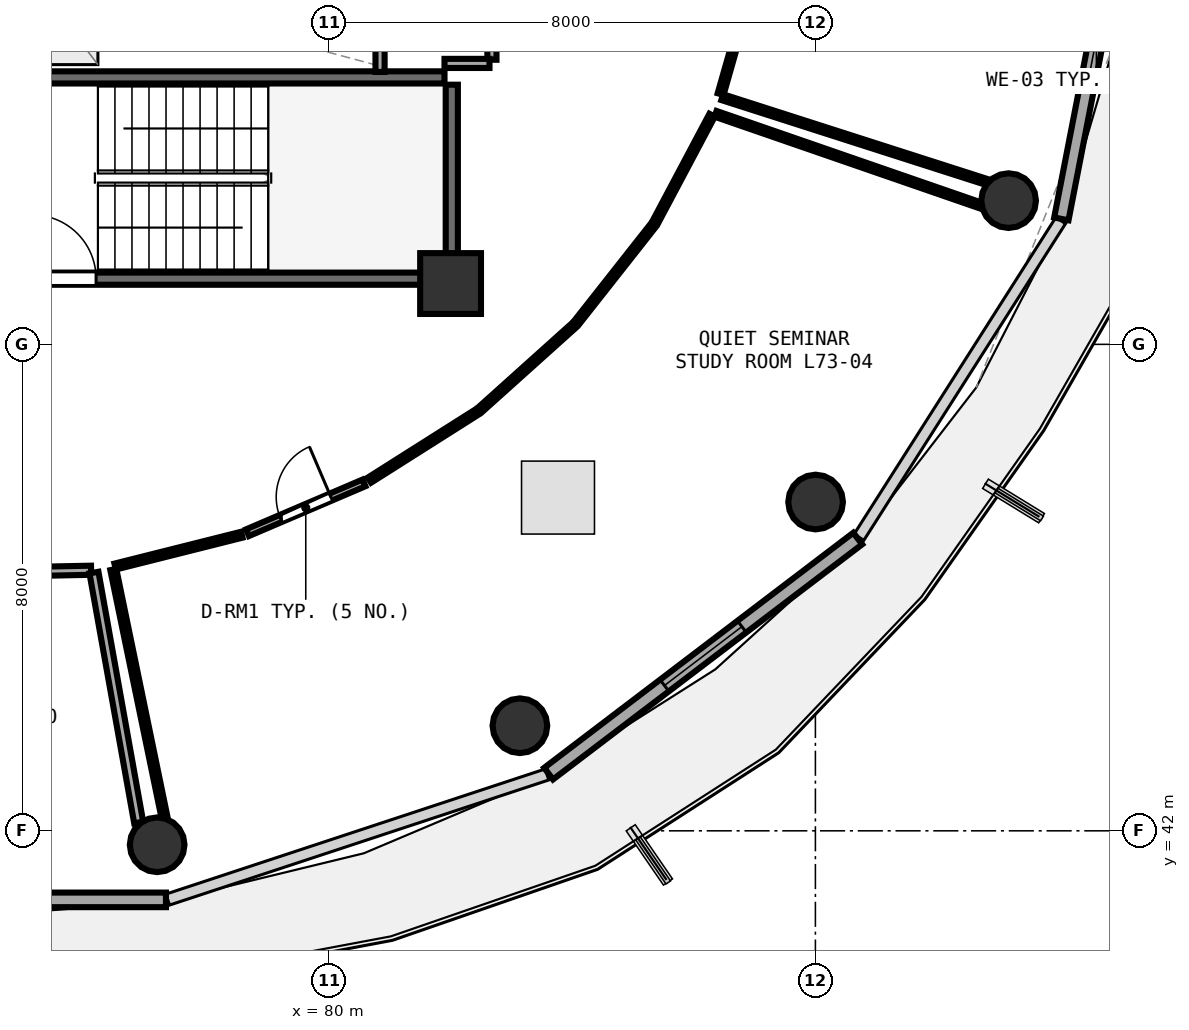
"""IFC4 building model, lengths in metres.
Left out: names, types, materials, properties, quantities, classifications, styles, units other than length and angle.
Written with IfcOpenShell. Run it as: python <this file> out.ifc"""

import sys

from ifc_helpers import new_model, si_unit, direction, frame, frame_2d, origin, origin_2d, place, context, subcontext, project, spatial, rectangle, circle, extrude, element, fill, save


model = new_model("IFC4")
c1 = context("Model", 3, precision=1e-05, world=origin(), true_north=direction((0.0, 1.0)))
c2 = subcontext(c1, "Body", "Model", "MODEL_VIEW")
j1 = project(units=[si_unit("LENGTHUNIT", "METRE"), si_unit("PLANEANGLEUNIT", "RADIAN")], contexts=[c1])
p1 = place(None, origin())
s1 = spatial("IfcSite", under=j1, at=p1, CompositionType="ELEMENT")
p2 = place(p1, origin())
s2 = spatial("IfcBuilding", under=s1, at=p2, CompositionType="ELEMENT")
p3 = place(p2, frame((0.0, 0.0, 286.2)))
s3 = spatial("IfcBuildingStorey", under=s2, at=p3, CompositionType="ELEMENT", Elevation=286.2)
p4 = place(p3, frame((82.0, 51.0, 0.0), z_axis=(0.0, 0.0, 1.0), x_axis=(1.0, 0.0, 0.0)))
e1 = element("IfcColumn", 1, at=p4, inside=s3, PredefinedType="PILASTER", context=c2, shape_type="SweptSolid", body=[
    extrude(rectangle(XDim=1.0, YDim=1.0, at=origin_2d()), origin(), (0.0, 0.0, 1.0), 3.75),
])
for number, where, z_axis, x_axis in (
    (2, (77.174, 41.771, 0.0), (0.0, 0.0, 1.0), (1.0, 0.0, 0.0)),
    (3, (83.14, 43.728, 0.0), (0.0, 0.0, 1.0), (1.0, 0.0, 0.0)),
    (4, (88.003, 47.407, 0.0), (0.0, 0.0, 1.0), (1.0, 0.0, 0.0)),
    (5, (91.177, 52.364, 0.0), (0.0, 0.0, 1.0), (1.0, 0.0, 0.0)),
):
    element("IfcColumn", number, at=place(p3, frame(where, z_axis=z_axis, x_axis=x_axis)), inside=s3, PredefinedType="COLUMN", context=c2, shape_type="SweptSolid", body=[
        extrude(circle(Radius=0.45, at=origin_2d()), origin(), (0.0, 0.0, 1.0), 3.75),
    ])
p5 = place(p3, frame((70.681, 40.864, 0.0), z_axis=(0.0, 0.0, 1.0), x_axis=(1.0, 0.0, 0.0)))
e6 = element("IfcWall", 6, at=p5, inside=s3, PredefinedType="SOLIDWALL", context=c2, shape_type="SweptSolid", body=[
    extrude(rectangle(XDim=6.638, YDim=0.24, at=frame_2d((3.319, 0.0))), origin(), (0.0, 0.0, 1.0), 3.475),
])
p6 = place(p5, frame((2.519, 0.0, 0.85)))
e7 = element("IfcOpeningElement", 7, at=p6, cuts=e6, PredefinedType="OPENING", context=c2, shape_type="SweptSolid", body=[
    extrude(rectangle(XDim=1.6, YDim=1.45, at=frame_2d((0.8, 0.725))), frame((0.0, 0.13, 0.0), z_axis=(0.0, -1.0, 0.0), x_axis=(1.0, 0.0, 0.0)), (0.0, 0.0, 1.0), 0.26),
])
p7 = place(p3, frame((83.612, 42.94, 0.0), z_axis=(0.0, 0.0, 1.0), x_axis=(0.796010444211, 0.605282886514, 0.0)))
e8 = element("IfcWall", 8, at=p7, inside=s3, PredefinedType="SOLIDWALL", context=c2, shape_type="SweptSolid", body=[
    extrude(rectangle(XDim=6.387, YDim=0.24, at=frame_2d((3.194, 0.0))), origin(), (0.0, 0.0, 1.0), 3.475),
])
p8 = place(p7, frame((2.394, 0.0, 0.85)))
e9 = element("IfcOpeningElement", 9, at=p8, cuts=e8, PredefinedType="OPENING", context=c2, shape_type="SweptSolid", body=[
    extrude(rectangle(XDim=1.6, YDim=1.45, at=frame_2d((0.8, 0.725))), frame((0.0, 0.13, 0.0), z_axis=(0.0, -1.0, 0.0), x_axis=(1.0, 0.0, 0.0)), (0.0, 0.0, 1.0), 0.26),
])
p9 = place(p3, frame((92.045, 52.063, 0.0), z_axis=(0.0, 0.0, 1.0), x_axis=(0.190969309115, 0.981596008028, 0.0)))
e10 = element("IfcWall", 10, at=p9, inside=s3, PredefinedType="SOLIDWALL", context=c2, shape_type="SweptSolid", body=[
    extrude(rectangle(XDim=6.033, YDim=0.24, at=frame_2d((3.017, 0.0))), origin(), (0.0, 0.0, 1.0), 3.475),
])
p10 = place(p9, frame((2.216, 0.0, 0.85)))
e11 = element("IfcOpeningElement", 11, at=p10, cuts=e10, PredefinedType="OPENING", context=c2, shape_type="SweptSolid", body=[
    extrude(rectangle(XDim=1.6, YDim=1.45, at=frame_2d((0.8, 0.725))), frame((0.0, 0.13, 0.0), z_axis=(0.0, -1.0, 0.0), x_axis=(1.0, 0.0, 0.0)), (0.0, 0.0, 1.0), 0.26),
])
p11 = place(p3, frame((74.0, 51.08, 0.0), z_axis=(0.0, 0.0, 1.0), x_axis=(1.0, 0.0, 0.0)))
e12 = element("IfcWall", 12, at=p11, inside=s3, PredefinedType="SHEAR", context=c2, shape_type="SweptSolid", body=[
    extrude(rectangle(XDim=7.9, YDim=0.2, at=frame_2d((3.95, 0.0))), origin(), (0.0, 0.0, 1.0), 3.49),
])
p12 = place(p11, frame((1.12, 0.0, 0.0)))
e13 = element("IfcOpeningElement", 13, at=p12, cuts=e12, PredefinedType="OPENING", context=c2, shape_type="SweptSolid", body=[
    extrude(rectangle(XDim=1.05, YDim=2.1, at=frame_2d((0.525, 1.05))), frame((0.0, 0.11, 0.0), z_axis=(0.0, -1.0, 0.0), x_axis=(1.0, 0.0, 0.0)), (0.0, 0.0, 1.0), 0.22),
])
p13 = place(p3, frame((82.02, 51.2, 0.0), z_axis=(0.0, 0.0, 1.0), x_axis=(0.0, 1.0, 0.0)))
e14 = element("IfcWall", 14, at=p13, inside=s3, PredefinedType="SHEAR", context=c2, shape_type="SweptSolid", body=[
    extrude(rectangle(XDim=3.07, YDim=0.2, at=frame_2d((1.535, 0.0))), origin(), (0.0, 0.0, 1.0), 3.49),
])
p14 = place(p3, frame((81.9, 54.39, 0.0), z_axis=(0.0, 0.0, 1.0), x_axis=(-1.0, 0.0, 0.0)))
e15 = element("IfcWall", 15, at=p14, inside=s3, PredefinedType="SHEAR", context=c2, shape_type="SweptSolid", body=[
    extrude(rectangle(XDim=8.46, YDim=0.2, at=frame_2d((4.23, 0.0))), origin(), (0.0, 0.0, 1.0), 3.49),
])
p15 = place(p3, frame((80.84, 54.48, 0.0), z_axis=(0.0, 0.0, 1.0), x_axis=(0.0, 1.0, 0.0)))
e16 = element("IfcWall", 16, at=p15, inside=s3, PredefinedType="PARTITIONING", context=c2, shape_type="SweptSolid", body=[
    extrude(rectangle(XDim=2.29, YDim=0.15, at=frame_2d((1.145, 0.0))), origin(), (0.0, 0.0, 1.0), 3.48),
])
p16 = place(p3, frame((82.68, 54.68, 0.0), z_axis=(0.0, 0.0, 1.0), x_axis=(0.0, 1.0, 0.0)))
e17 = element("IfcWall", 17, at=p16, inside=s3, PredefinedType="PARTITIONING", context=c2, shape_type="SweptSolid", body=[
    extrude(rectangle(XDim=2.21, YDim=0.15, at=frame_2d((1.105, 0.0))), origin(), (0.0, 0.0, 1.0), 3.48),
])
p17 = place(p16, frame((0.565, 0.0, 0.0)))
e18 = element("IfcOpeningElement", 18, at=p17, cuts=e17, PredefinedType="OPENING", context=c2, shape_type="SweptSolid", body=[
    extrude(rectangle(XDim=1.08, YDim=2.1, at=frame_2d((0.54, 1.05))), frame((0.0, 0.085, 0.0), z_axis=(0.0, -1.0, 0.0), x_axis=(1.0, 0.0, 0.0)), (0.0, 0.0, 1.0), 0.17),
])
p18 = place(p3, frame((78.66, 46.903, 0.0), z_axis=(0.0, 0.0, 1.0), x_axis=(0.919508345424, 0.39307048057, 0.0)))
e19 = element("IfcWall", 19, at=p18, inside=s3, PredefinedType="PARTITIONING", context=c2, shape_type="SweptSolid", body=[
    extrude(rectangle(XDim=2.083, YDim=0.12, at=frame_2d((1.042, 0.0))), origin(), (0.0, 0.0, 1.0), 3.48),
])
p19 = place(p18, frame((0.592, 0.0, 0.0)))
e20 = element("IfcOpeningElement", 20, at=p19, cuts=e19, PredefinedType="OPENING", context=c2, shape_type="SweptSolid", body=[
    extrude(rectangle(XDim=0.9, YDim=2.08, at=frame_2d((0.45, 1.04))), frame((0.0, 0.07, 0.0), z_axis=(0.0, -1.0, 0.0), x_axis=(1.0, 0.0, 0.0)), (0.0, 0.0, 1.0), 0.14),
])
p20 = place(p3, frame((81.9, 54.62, 0.0), z_axis=(0.0, 0.0, 1.0), x_axis=(1.0, 0.0, 0.0)))
e21 = element("IfcWall", 21, at=p20, inside=s3, PredefinedType="PARTITIONING", context=c2, shape_type="SweptSolid", body=[
    extrude(rectangle(XDim=0.74, YDim=0.15, at=frame_2d((0.37, 0.0))), origin(), (0.0, 0.0, 1.0), 2.775),
])
p21 = place(p3, frame((72.507, 46.212, 0.0), z_axis=(0.0, 0.0, 1.0), x_axis=(0.999790880908, 0.02044980325, 0.0)))
e22 = element("IfcWall", 22, at=p21, inside=s3, PredefinedType="PARTITIONING", context=c2, shape_type="SweptSolid", body=[
    extrude(rectangle(XDim=3.582, YDim=0.15, at=frame_2d((1.791, 0.0))), origin(), (0.0, 0.0, 1.0), 3.075),
])
p22 = place(p3, frame((76.135, 46.247, 0.0), z_axis=(0.0, 0.0, 1.0), x_axis=(0.176199339585, -0.984354505618, 0.0)))
e23 = element("IfcWall", 23, at=p22, inside=s3, PredefinedType="PARTITIONING", context=c2, shape_type="SweptSolid", body=[
    extrude(rectangle(XDim=4.176, YDim=0.15, at=frame_2d((2.088, 0.0))), origin(), (0.0, 0.0, 1.0), 3.075),
])
p23 = place(p3, frame((76.484, 46.346, 0.0), z_axis=(0.0, 0.0, 1.0), x_axis=(0.969827312174, 0.243792913272, 0.0)))
e24 = element("IfcWall", 24, at=p23, inside=s3, PredefinedType="PARTITIONING", context=c2, shape_type="SweptSolid", body=[
    extrude(rectangle(XDim=2.147, YDim=0.1, at=frame_2d((1.073, 0.0))), origin(), (0.0, 0.0, 1.0), 3.48),
])
p24 = place(p3, frame((80.665, 47.766, 0.0), z_axis=(0.0, 0.0, 1.0), x_axis=(0.844856002064, 0.534993771717, 0.0)))
e25 = element("IfcWall", 25, at=p24, inside=s3, PredefinedType="PARTITIONING", context=c2, shape_type="SweptSolid", body=[
    extrude(rectangle(XDim=2.092, YDim=0.1, at=frame_2d((1.046, 0.0))), origin(), (0.0, 0.0, 1.0), 3.075),
])
p25 = place(p3, frame((82.496, 48.934, 0.0), z_axis=(0.0, 0.0, 1.0), x_axis=(0.743943808924, 0.668242178527, 0.0)))
e26 = element("IfcWall", 26, at=p25, inside=s3, PredefinedType="PARTITIONING", context=c2, shape_type="SweptSolid", body=[
    extrude(rectangle(XDim=2.054, YDim=0.1, at=frame_2d((1.027, 0.0))), origin(), (0.0, 0.0, 1.0), 3.075),
])
p26 = place(p3, frame((84.079, 50.365, 0.0), z_axis=(0.0, 0.0, 1.0), x_axis=(0.618820199788, 0.785532660259, 0.0)))
e27 = element("IfcWall", 27, at=p26, inside=s3, PredefinedType="PARTITIONING", context=c2, shape_type="SweptSolid", body=[
    extrude(rectangle(XDim=2.018, YDim=0.1, at=frame_2d((1.009, 0.0))), origin(), (0.0, 0.0, 1.0), 3.075),
])
p27 = place(p3, frame((85.371, 52.016, 0.0), z_axis=(0.0, 0.0, 1.0), x_axis=(0.468933294906, 0.883233584579, 0.0)))
e28 = element("IfcWall", 28, at=p27, inside=s3, PredefinedType="PARTITIONING", context=c2, shape_type="SweptSolid", body=[
    extrude(rectangle(XDim=1.984, YDim=0.1, at=frame_2d((0.992, 0.0))), origin(), (0.0, 0.0, 1.0), 3.235),
])
p28 = place(p3, frame((86.358, 53.791, 0.0), z_axis=(0.0, 0.0, 1.0), x_axis=(0.945103281494, -0.326771766388, 0.0)))
e29 = element("IfcWall", 29, at=p28, inside=s3, PredefinedType="PARTITIONING", context=c2, shape_type="SweptSolid", body=[
    extrude(rectangle(XDim=4.604, YDim=0.1, at=frame_2d((2.302, 0.0))), origin(), (0.0, 0.0, 1.0), 3.075),
])
p29 = place(p3, frame((77.293, 42.23, 0.0), z_axis=(0.0, 0.0, 1.0), x_axis=(-0.202308141573, 0.979321916355, 0.0)))
e30 = element("IfcWall", 30, at=p29, inside=s3, PredefinedType="PARTITIONING", context=c2, shape_type="SweptSolid", body=[
    extrude(rectangle(XDim=4.153, YDim=0.1, at=frame_2d((2.076, 0.0))), origin(), (0.0, 0.0, 1.0), 3.175),
])
p30 = place(p3, frame((86.441, 54.115, 0.0), z_axis=(0.0, 0.0, 1.0), x_axis=(0.274226302341, 0.961665188673, 0.0)))
e31 = element("IfcWall", 31, at=p30, inside=s3, PredefinedType="PARTITIONING", context=c2, shape_type="SweptSolid", body=[
    extrude(rectangle(XDim=1.955, YDim=0.1, at=frame_2d((0.978, 0.0))), origin(), (0.0, 0.0, 1.0), 3.48),
])
p31 = place(p3, frame((90.816, 52.671, 0.0), z_axis=(0.0, 0.0, 1.0), x_axis=(-0.95227750557, 0.305233602976, 0.0)))
e32 = element("IfcWall", 32, at=p31, inside=s3, PredefinedType="PARTITIONING", context=c2, shape_type="SweptSolid", body=[
    extrude(rectangle(XDim=4.565, YDim=0.1, at=frame_2d((2.283, 0.0))), origin(), (0.0, 0.0, 1.0), 3.175),
])
p32 = place(p8, origin())
e33 = element("IfcWindow", 33, at=p32, inside=s3, PartitioningType="SINGLE_PANEL", PredefinedType="WINDOW", context=c2, shape_type="SweptSolid", body=[
    extrude(rectangle(XDim=1.6, YDim=1.45, at=frame_2d((0.8, 0.725))), frame((0.0, 0.03, 0.0), z_axis=(0.0, -1.0, 0.0), x_axis=(1.0, 0.0, 0.0)), (0.0, 0.0, 1.0), 0.06),
])
fill(e9, e33)
p33 = place(p10, origin())
e34 = element("IfcWindow", 34, at=p33, inside=s3, PartitioningType="SINGLE_PANEL", PredefinedType="WINDOW", context=c2, shape_type="SweptSolid", body=[
    extrude(rectangle(XDim=1.6, YDim=1.45, at=frame_2d((0.8, 0.725))), frame((0.0, 0.03, 0.0), z_axis=(0.0, -1.0, 0.0), x_axis=(1.0, 0.0, 0.0)), (0.0, 0.0, 1.0), 0.06),
])
fill(e11, e34)
p34 = place(p12, origin())
e35 = element("IfcDoor", 35, at=p34, inside=s3, OperationType="SINGLE_SWING_LEFT", PredefinedType="DOOR", context=c2, shape_type="SweptSolid", body=[
    extrude(rectangle(XDim=1.05, YDim=2.1, at=frame_2d((0.525, 1.05))), frame((0.0, 0.025, 0.0), z_axis=(0.0, -1.0, 0.0), x_axis=(1.0, 0.0, 0.0)), (0.0, 0.0, 1.0), 0.05),
])
fill(e13, e35)
p35 = place(p19, origin())
e36 = element("IfcDoor", 36, at=p35, inside=s3, OperationType="SINGLE_SWING_RIGHT", PredefinedType="DOOR", context=c2, shape_type="SweptSolid", body=[
    extrude(rectangle(XDim=0.9, YDim=2.08, at=frame_2d((0.45, 1.04))), frame((0.0, 0.025, 0.0), z_axis=(0.0, -1.0, 0.0), x_axis=(1.0, 0.0, 0.0)), (0.0, 0.0, 1.0), 0.05),
])
fill(e20, e36)
save(model, sys.argv[1])
